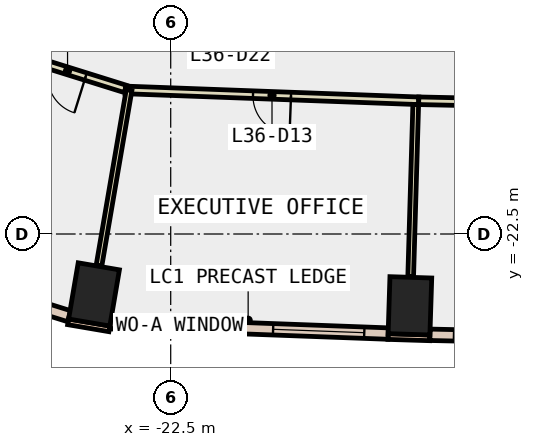
"""IFC4 building model, lengths in metres.
Left out: names, types, materials, properties, quantities, classifications, styles, units other than length and angle.
Written with IfcOpenShell. Run it as: python <this file> out.ifc"""

import sys

from ifc_helpers import new_model, si_unit, direction, frame, frame_2d, origin, origin_2d, place, context, subcontext, project, spatial, rectangle, extrude, element, fill, save


model = new_model("IFC4")
c1 = context("Model", 3, precision=1e-05, world=origin(), true_north=direction((0.0, 1.0)))
c2 = subcontext(c1, "Body", "Model", "MODEL_VIEW")
j1 = project(units=[si_unit("LENGTHUNIT", "METRE"), si_unit("PLANEANGLEUNIT", "RADIAN")], contexts=[c1])
p1 = place(None, origin())
s1 = spatial("IfcSite", under=j1, at=p1, CompositionType="ELEMENT")
p2 = place(p1, origin())
s2 = spatial("IfcBuilding", under=s1, at=p2, CompositionType="ELEMENT")
p3 = place(p2, frame((0.0, 0.0, 163.4)))
s3 = spatial("IfcBuildingStorey", under=s2, at=p3, CompositionType="ELEMENT", Elevation=163.4)
for number, where, z_axis, x_axis in (
    (1, (-24.518, -24.09, -0.4), (0.0, 0.0, 1.0), (-0.986, 0.168, 0.0)),
    (2, (-16.205, -24.39, -0.4), (0.0, 0.0, 1.0), (-0.999, 0.032, 0.0)),
):
    element("IfcColumn", number, at=place(p3, frame(where, z_axis=z_axis, x_axis=x_axis)), inside=s3, PredefinedType="COLUMN", context=c2, shape_type="SweptSolid", body=[
        extrude(rectangle(XDim=1.1, YDim=1.5, at=origin_2d()), origin(), (0.0, 0.0, 1.0), 4.2),
    ])
p4 = place(p3, frame((-25.199, -24.811, 0.0), z_axis=(0.0, 0.0, 1.0), x_axis=(0.985763338892, -0.168138751323, 0.0)))
e3 = element("IfcWall", 3, at=p4, inside=s3, PredefinedType="STANDARD", context=c2, shape_type="SweptSolid", body=[
    extrude(rectangle(XDim=1.101, YDim=0.15, at=frame_2d((0.55, 0.0))), origin(), (0.0, 0.0, 1.0), 3.8),
])
p5 = place(p3, frame((-16.781, -25.198, 0.0), z_axis=(0.0, 0.0, 1.0), x_axis=(0.999523702549, -0.030860460829, 0.0)))
e4 = element("IfcWall", 4, at=p5, inside=s3, PredefinedType="STANDARD", context=c2, shape_type="SweptSolid", body=[
    extrude(rectangle(XDim=1.1, YDim=0.15, at=frame_2d((0.55, 0.0))), origin(), (0.0, 0.0, 1.0), 3.8),
])
p6 = place(p3, frame((-24.09, -24.848, 0.0), z_axis=(0.0, 0.0, 1.0), x_axis=(0.999307730926, -0.037202942236, 0.0)))
e5 = element("IfcWall", 5, at=p6, inside=s3, PredefinedType="STANDARD", context=c2, shape_type="SweptSolid", body=[
    extrude(rectangle(XDim=7.317, YDim=0.3, at=frame_2d((3.659, 0.0))), origin(), (0.0, 0.0, 1.0), 3.8),
])
p7 = place(p6, frame((0.629, 0.0, 0.9)))
e6 = element("IfcOpeningElement", 6, at=p7, cuts=e5, PredefinedType="OPENING", context=c2, shape_type="SweptSolid", body=[
    extrude(rectangle(XDim=2.4, YDim=2.6, at=frame_2d((1.2, 1.3))), frame((0.0, 0.16, 0.0), z_axis=(0.0, -1.0, 0.0), x_axis=(1.0, 0.0, 0.0)), (0.0, 0.0, 1.0), 0.32),
])
p8 = place(p6, frame((4.288, 0.0, 0.9)))
e7 = element("IfcOpeningElement", 7, at=p8, cuts=e5, PredefinedType="OPENING", context=c2, shape_type="SweptSolid", body=[
    extrude(rectangle(XDim=2.4, YDim=2.6, at=frame_2d((1.2, 1.3))), frame((0.0, 0.16, 0.0), z_axis=(0.0, -1.0, 0.0), x_axis=(1.0, 0.0, 0.0)), (0.0, 0.0, 1.0), 0.32),
])
p9 = place(p3, frame((-15.68, -25.152, 0.0), z_axis=(0.0, 0.0, 1.0), x_axis=(0.999765201774, -0.021668902196, 0.0)))
e8 = element("IfcWall", 8, at=p9, inside=s3, PredefinedType="STANDARD", context=c2, shape_type="SweptSolid", body=[
    extrude(rectangle(XDim=7.335, YDim=0.3, at=frame_2d((3.667, 0.0))), origin(), (0.0, 0.0, 1.0), 3.8),
])
p10 = place(p9, frame((0.634, 0.0, 0.9)))
e9 = element("IfcOpeningElement", 9, at=p10, cuts=e8, PredefinedType="OPENING", context=c2, shape_type="SweptSolid", body=[
    extrude(rectangle(XDim=2.4, YDim=2.6, at=frame_2d((1.2, 1.3))), frame((0.0, 0.16, 0.0), z_axis=(0.0, -1.0, 0.0), x_axis=(1.0, 0.0, 0.0)), (0.0, 0.0, 1.0), 0.32),
])
p11 = place(p9, frame((4.301, 0.0, 0.9)))
e10 = element("IfcOpeningElement", 10, at=p11, cuts=e8, PredefinedType="OPENING", context=c2, shape_type="SweptSolid", body=[
    extrude(rectangle(XDim=2.4, YDim=2.6, at=frame_2d((1.2, 1.3))), frame((0.0, 0.16, 0.0), z_axis=(0.0, -1.0, 0.0), x_axis=(1.0, 0.0, 0.0)), (0.0, 0.0, 1.0), 0.32),
])
p12 = place(p3, frame((-29.298, -23.376, 0.0), z_axis=(0.0, 0.0, 1.0), x_axis=(0.954628614874, -0.29779893832, 0.0)))
e11 = element("IfcWall", 11, at=p12, inside=s3, PredefinedType="STANDARD", context=c2, shape_type="SweptSolid", body=[
    extrude(rectangle(XDim=4.322, YDim=0.3, at=frame_2d((2.161, 0.0))), origin(), (0.0, 0.0, 1.0), 3.8),
])
p13 = place(p12, frame((1.461, 0.0, 0.9)))
e12 = element("IfcOpeningElement", 12, at=p13, cuts=e11, PredefinedType="OPENING", context=c2, shape_type="SweptSolid", body=[
    extrude(rectangle(XDim=1.4, YDim=2.6, at=frame_2d((0.7, 1.3))), frame((0.0, 0.16, 0.0), z_axis=(0.0, -1.0, 0.0), x_axis=(1.0, 0.0, 0.0)), (0.0, 0.0, 1.0), 0.32),
])
p14 = place(p3, frame((-23.691, -18.683, 0.0), z_axis=(0.0, 0.0, 1.0), x_axis=(-0.954546657381, 0.298061535398, 0.0)))
e13 = element("IfcWall", 13, at=p14, inside=s3, PredefinedType="PARTITIONING", context=c2, shape_type="SweptSolid", body=[
    extrude(rectangle(XDim=3.191, YDim=0.2, at=frame_2d((1.596, 0.0))), origin(), (0.0, 0.0, 1.0), 3.8),
])
p15 = place(p14, frame((1.096, 0.0, 0.0)))
e14 = element("IfcOpeningElement", 14, at=p15, cuts=e13, PredefinedType="OPENING", context=c2, shape_type="SweptSolid", body=[
    extrude(rectangle(XDim=1.0, YDim=2.1, at=frame_2d((0.5, 1.05))), frame((0.0, 0.11, 0.0), z_axis=(0.0, -1.0, 0.0), x_axis=(1.0, 0.0, 0.0)), (0.0, 0.0, 1.0), 0.22),
])
p16 = place(p3, frame((-15.974, -18.995, 0.0), z_axis=(0.0, 0.0, 1.0), x_axis=(-0.999314011084, 0.037033866276, 0.0)))
e15 = element("IfcWall", 15, at=p16, inside=s3, PredefinedType="PARTITIONING", context=c2, shape_type="SweptSolid", body=[
    extrude(rectangle(XDim=7.726, YDim=0.2, at=frame_2d((3.863, 0.0))), origin(), (0.0, 0.0, 1.0), 3.8),
])
p17 = place(p16, frame((3.363, 0.0, 0.0)))
e16 = element("IfcOpeningElement", 16, at=p17, cuts=e15, PredefinedType="OPENING", context=c2, shape_type="SweptSolid", body=[
    extrude(rectangle(XDim=1.0, YDim=2.1, at=frame_2d((0.5, 1.05))), frame((0.0, 0.11, 0.0), z_axis=(0.0, -1.0, 0.0), x_axis=(1.0, 0.0, 0.0)), (0.0, 0.0, 1.0), 0.22),
])
p18 = place(p3, frame((-7.7, -19.174, 0.0), z_axis=(0.0, 0.0, 1.0), x_axis=(-0.999762993889, 0.02177053169, 0.0)))
e17 = element("IfcWall", 17, at=p18, inside=s3, PredefinedType="PARTITIONING", context=c2, shape_type="SweptSolid", body=[
    extrude(rectangle(XDim=8.276, YDim=0.2, at=frame_2d((4.138, 0.0))), origin(), (0.0, 0.0, 1.0), 3.8),
])
p19 = place(p18, frame((3.713, 0.0, 0.0)))
e18 = element("IfcOpeningElement", 18, at=p19, cuts=e17, PredefinedType="OPENING", context=c2, shape_type="SweptSolid", body=[
    extrude(rectangle(XDim=1.0, YDim=2.1, at=frame_2d((0.5, 1.05))), frame((0.0, 0.11, 0.0), z_axis=(0.0, -1.0, 0.0), x_axis=(1.0, 0.0, 0.0)), (0.0, 0.0, 1.0), 0.22),
])
p20 = place(p3, frame((-23.595, -18.712, 0.0), z_axis=(0.0, 0.0, 1.0), x_axis=(-0.168992733164, -0.985617296996, 0.0)))
e19 = element("IfcWall", 19, at=p20, inside=s3, PredefinedType="PARTITIONING", context=c2, shape_type="SweptSolid", body=[
    extrude(rectangle(XDim=4.687, YDim=0.15, at=frame_2d((2.343, 0.0))), origin(), (0.0, 0.0, 1.0), 3.8),
])
p21 = place(p3, frame((-16.052, -19.092, 0.0), z_axis=(0.0, 0.0, 1.0), x_axis=(-0.029372127975, -0.999568545973, 0.0)))
e20 = element("IfcWall", 20, at=p21, inside=s3, PredefinedType="PARTITIONING", context=c2, shape_type="SweptSolid", body=[
    extrude(rectangle(XDim=4.53, YDim=0.15, at=frame_2d((2.265, 0.0))), origin(), (0.0, 0.0, 1.0), 3.8),
])
p22 = place(p7, origin())
e21 = element("IfcWindow", 21, at=p22, inside=s3, PartitioningType="SINGLE_PANEL", PredefinedType="WINDOW", context=c2, shape_type="SweptSolid", body=[
    extrude(rectangle(XDim=2.4, YDim=2.6, at=frame_2d((1.2, 1.3))), frame((0.0, 0.03, 0.0), z_axis=(0.0, -1.0, 0.0), x_axis=(1.0, 0.0, 0.0)), (0.0, 0.0, 1.0), 0.06),
])
fill(e6, e21)
p23 = place(p8, origin())
e22 = element("IfcWindow", 22, at=p23, inside=s3, PartitioningType="SINGLE_PANEL", PredefinedType="WINDOW", context=c2, shape_type="SweptSolid", body=[
    extrude(rectangle(XDim=2.4, YDim=2.6, at=frame_2d((1.2, 1.3))), frame((0.0, 0.03, 0.0), z_axis=(0.0, -1.0, 0.0), x_axis=(1.0, 0.0, 0.0)), (0.0, 0.0, 1.0), 0.06),
])
fill(e7, e22)
p24 = place(p15, origin())
e23 = element("IfcDoor", 23, at=p24, inside=s3, OperationType="SINGLE_SWING_LEFT", PredefinedType="DOOR", context=c2, shape_type="SweptSolid", body=[
    extrude(rectangle(XDim=1.0, YDim=2.1, at=frame_2d((0.5, 1.05))), frame((0.0, 0.025, 0.0), z_axis=(0.0, -1.0, 0.0), x_axis=(1.0, 0.0, 0.0)), (0.0, 0.0, 1.0), 0.05),
])
fill(e14, e23)
p25 = place(p17, origin())
e24 = element("IfcDoor", 24, at=p25, inside=s3, OperationType="SINGLE_SWING_LEFT", PredefinedType="DOOR", context=c2, shape_type="SweptSolid", body=[
    extrude(rectangle(XDim=1.0, YDim=2.1, at=frame_2d((0.5, 1.05))), frame((0.0, 0.025, 0.0), z_axis=(0.0, -1.0, 0.0), x_axis=(1.0, 0.0, 0.0)), (0.0, 0.0, 1.0), 0.05),
])
fill(e16, e24)
save(model, sys.argv[1])
